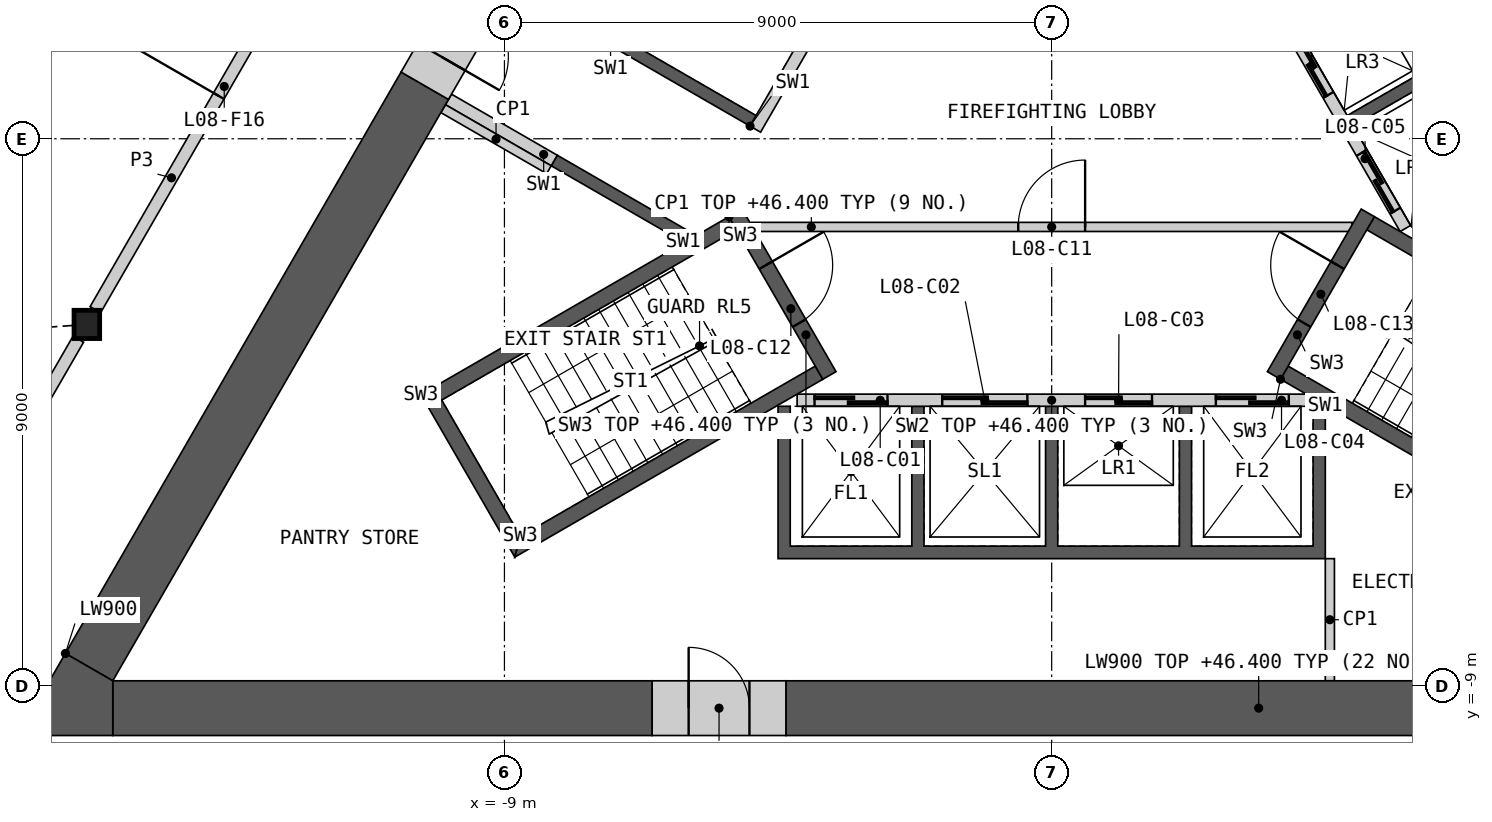
"""IFC4 building model, lengths in metres.
Left out: names, types, materials, properties, quantities, classifications, styles, units other than length and angle.
Written with IfcOpenShell. Run it as: python <this file> out.ifc"""

import sys

from ifc_helpers import new_model, si_unit, direction, frame, frame_2d, origin, origin_2d, place, context, subcontext, project, spatial, polyline, rectangle, i_section, outline, extrude, element, fill, save


model = new_model("IFC4")
c1 = context("Model", 3, precision=1e-05, world=origin(), true_north=direction((0.0, 1.0)))
c2 = subcontext(c1, "Body", "Model", "MODEL_VIEW")
j1 = project(units=[si_unit("LENGTHUNIT", "METRE"), si_unit("PLANEANGLEUNIT", "RADIAN")], contexts=[c1])
p1 = place(None, origin())
s1 = spatial("IfcSite", under=j1, at=p1, CompositionType="ELEMENT")
p2 = place(p1, origin())
s2 = spatial("IfcBuilding", under=s1, at=p2, CompositionType="ELEMENT")
p3 = place(p2, frame((0.0, 0.0, 42.6)))
s3 = spatial("IfcBuildingStorey", under=s2, at=p3, CompositionType="ELEMENT", Elevation=42.6)
p4 = place(p3, frame((-15.868, -3.054, 0.0), z_axis=(0.0, 0.0, 1.0), x_axis=(1.0, 0.0, 0.0)))
e1 = element("IfcColumn", 1, at=p4, inside=s3, PredefinedType="COLUMN", context=c2, shape_type="SweptSolid", body=[
    extrude(i_section(OverallWidth=0.421, OverallDepth=0.465, WebThickness=0.045, FlangeThickness=0.072, at=origin_2d()), origin(), (0.0, 0.0, 1.0), 4.2),
])
p5 = place(p3, origin())
e2 = element("IfcWall", 2, at=p5, inside=s3, PredefinedType="SHEAR", context=c2, shape_type="SweptSolid", body=[
    extrude(outline(polyline([(4.5, -4.4), (4.5, -6.906), (-4.5, -6.906), (-4.5, -4.4), (-4.3, -4.4), (-4.3, -6.7), (-2.3, -6.7), (-2.3, -4.4), (-2.1, -4.4), (-2.1, -6.7), (-0.1, -6.7), (-0.1, -4.4), (0.1, -4.4), (0.1, -6.7), (2.1, -6.7), (2.1, -4.4), (2.3, -4.4), (2.3, -6.7), (4.3, -6.7), (4.3, -4.4), (4.5, -4.4)])), origin(), (0.0, 0.0, 1.0), 3.8),
])
p6 = place(p3, frame((-4.187, -4.3, 0.0), z_axis=(0.0, 0.0, 1.0), x_axis=(1.0, 0.0, 0.0)))
e3 = element("IfcWall", 3, at=p6, inside=s3, PredefinedType="SOLIDWALL", context=c2, shape_type="SweptSolid", body=[
    extrude(rectangle(XDim=8.373, YDim=0.2, at=frame_2d((4.187, 0.0))), origin(), (0.0, 0.0, 1.0), 3.8),
])
p7 = place(p6, frame((0.287, 0.0, 0.0)))
e4 = element("IfcOpeningElement", 4, at=p7, cuts=e3, PredefinedType="OPENING", context=c2, shape_type="SweptSolid", body=[
    extrude(rectangle(XDim=1.2, YDim=2.1, at=frame_2d((0.6, 1.05))), frame((0.0, 0.11, 0.0), z_axis=(0.0, -1.0, 0.0), x_axis=(1.0, 0.0, 0.0)), (0.0, 0.0, 1.0), 0.22),
])
p8 = place(p6, frame((2.387, 0.0, 0.0)))
e5 = element("IfcOpeningElement", 5, at=p8, cuts=e3, PredefinedType="OPENING", context=c2, shape_type="SweptSolid", body=[
    extrude(rectangle(XDim=1.4, YDim=2.1, at=frame_2d((0.7, 1.05))), frame((0.0, 0.11, 0.0), z_axis=(0.0, -1.0, 0.0), x_axis=(1.0, 0.0, 0.0)), (0.0, 0.0, 1.0), 0.22),
])
p9 = place(p6, frame((4.737, 0.0, 0.0)))
e6 = element("IfcOpeningElement", 6, at=p9, cuts=e3, PredefinedType="OPENING", context=c2, shape_type="SweptSolid", body=[
    extrude(rectangle(XDim=1.1, YDim=2.1, at=frame_2d((0.55, 1.05))), frame((0.0, 0.11, 0.0), z_axis=(0.0, -1.0, 0.0), x_axis=(1.0, 0.0, 0.0)), (0.0, 0.0, 1.0), 0.22),
])
p10 = place(p6, frame((6.887, 0.0, 0.0)))
e7 = element("IfcOpeningElement", 7, at=p10, cuts=e3, PredefinedType="OPENING", context=c2, shape_type="SweptSolid", body=[
    extrude(rectangle(XDim=1.2, YDim=2.1, at=frame_2d((0.6, 1.05))), frame((0.0, 0.11, 0.0), z_axis=(0.0, -1.0, 0.0), x_axis=(1.0, 0.0, 0.0)), (0.0, 0.0, 1.0), 0.22),
])
p11 = place(p3, origin())
e8 = element("IfcWall", 8, at=p11, inside=s3, PredefinedType="SHEAR", context=c2, shape_type="SweptSolid", body=[
    extrude(outline(polyline([(2.66, 4.192), (4.831, 5.445), (8.231, -0.444), (6.061, -1.697), (5.96, -1.524), (7.952, -0.374), (6.952, 1.358), (4.96, 0.208), (4.861, 0.381), (6.852, 1.531), (5.852, 3.263), (3.861, 2.113), (3.76, 2.287), (5.752, 3.437), (4.752, 5.169), (2.76, 4.019), (2.66, 4.192)])), origin(), (0.0, 0.0, 1.0), 3.8),
])
p12 = place(p3, frame((5.817, -1.476, 0.0), z_axis=(0.0, 0.0, 1.0), x_axis=(-0.500002616675, 0.866023893041, 0.0)))
e9 = element("IfcWall", 9, at=p12, inside=s3, PredefinedType="SOLIDWALL", context=c2, shape_type="SweptSolid", body=[
    extrude(rectangle(XDim=8.373, YDim=0.2, at=frame_2d((4.187, 0.0))), origin(), (0.0, 0.0, 1.0), 3.8),
])
p13 = place(p12, frame((0.337, 0.0, 0.0)))
e10 = element("IfcOpeningElement", 10, at=p13, cuts=e9, PredefinedType="OPENING", context=c2, shape_type="SweptSolid", body=[
    extrude(rectangle(XDim=1.1, YDim=2.1, at=frame_2d((0.55, 1.05))), frame((0.0, 0.11, 0.0), z_axis=(0.0, -1.0, 0.0), x_axis=(1.0, 0.0, 0.0)), (0.0, 0.0, 1.0), 0.22),
])
p14 = place(p12, frame((2.537, 0.0, 0.0)))
e11 = element("IfcOpeningElement", 11, at=p14, cuts=e9, PredefinedType="OPENING", context=c2, shape_type="SweptSolid", body=[
    extrude(rectangle(XDim=1.1, YDim=2.1, at=frame_2d((0.55, 1.05))), frame((0.0, 0.11, 0.0), z_axis=(0.0, -1.0, 0.0), x_axis=(1.0, 0.0, 0.0)), (0.0, 0.0, 1.0), 0.22),
])
p15 = place(p12, frame((4.737, 0.0, 0.0)))
e12 = element("IfcOpeningElement", 12, at=p15, cuts=e9, PredefinedType="OPENING", context=c2, shape_type="SweptSolid", body=[
    extrude(rectangle(XDim=1.1, YDim=2.1, at=frame_2d((0.55, 1.05))), frame((0.0, 0.11, 0.0), z_axis=(0.0, -1.0, 0.0), x_axis=(1.0, 0.0, 0.0)), (0.0, 0.0, 1.0), 0.22),
])
p16 = place(p12, frame((7.037, 0.0, 0.0)))
e13 = element("IfcOpeningElement", 13, at=p16, cuts=e9, PredefinedType="OPENING", context=c2, shape_type="SweptSolid", body=[
    extrude(rectangle(XDim=0.9, YDim=2.1, at=frame_2d((0.45, 1.05))), frame((0.0, 0.11, 0.0), z_axis=(0.0, -1.0, 0.0), x_axis=(1.0, 0.0, 0.0)), (0.0, 0.0, 1.0), 0.22),
])
p17 = place(p3, origin())
e14 = element("IfcWall", 14, at=p17, inside=s3, PredefinedType="SHEAR", context=c2, shape_type="SweptSolid", body=[
    extrude(outline(polyline([(-6.061, -1.697), (-8.231, -0.444), (-8.131, -0.271), (-5.96, -1.524), (-6.061, -1.697)])), origin(), (0.0, 0.0, 1.0), 3.8),
])
p18 = place(p3, origin())
e15 = element("IfcWall", 15, at=p18, inside=s3, PredefinedType="SHEAR", context=c2, shape_type="SweptSolid", body=[
    extrude(outline(polyline([(-4.96, 0.208), (-7.131, 1.461), (-5.931, 3.54), (-3.76, 2.287), (-3.861, 2.113), (-5.852, 3.263), (-6.852, 1.531), (-4.861, 0.381), (-4.96, 0.208)])), origin(), (0.0, 0.0, 1.0), 3.8),
])
p19 = place(p3, frame((-1.631, 5.776, 0.0), z_axis=(0.0, 0.0, 1.0), x_axis=(-0.499992876559, -0.866029516466, 0.0)))
e16 = element("IfcWall", 16, at=p19, inside=s3, PredefinedType="SOLIDWALL", context=c2, shape_type="SweptSolid", body=[
    extrude(rectangle(XDim=6.486, YDim=0.2, at=frame_2d((3.243, 0.0))), origin(), (0.0, 0.0, 1.0), 3.8),
])
p20 = place(p19, frame((0.437, 0.0, 0.0)))
e17 = element("IfcOpeningElement", 17, at=p20, cuts=e16, PredefinedType="OPENING", context=c2, shape_type="SweptSolid", body=[
    extrude(rectangle(XDim=0.9, YDim=2.1, at=frame_2d((0.45, 1.05))), frame((0.0, 0.11, 0.0), z_axis=(0.0, -1.0, 0.0), x_axis=(1.0, 0.0, 0.0)), (0.0, 0.0, 1.0), 0.22),
])
p21 = place(p19, frame((2.637, 0.0, 0.0)))
e18 = element("IfcOpeningElement", 18, at=p21, cuts=e16, PredefinedType="OPENING", context=c2, shape_type="SweptSolid", body=[
    extrude(rectangle(XDim=0.9, YDim=2.1, at=frame_2d((0.45, 1.05))), frame((0.0, 0.11, 0.0), z_axis=(0.0, -1.0, 0.0), x_axis=(1.0, 0.0, 0.0)), (0.0, 0.0, 1.0), 0.22),
])
p22 = place(p3, frame((-8.181, -0.357, 0.0), z_axis=(0.0, 0.0, 1.0), x_axis=(-0.866035824272, 0.499981950752, 0.0)))
e19 = element("IfcWall", 19, at=p22, inside=s3, PredefinedType="SHEAR", context=c2, shape_type="SweptSolid", body=[
    extrude(rectangle(XDim=2.009, YDim=0.2, at=frame_2d((1.004, 0.0))), origin(), (0.0, 0.0, 1.0), 3.8),
])
p23 = place(p3, frame((-4.941, -1.45, 0.0), z_axis=(0.0, 0.0, 1.0), x_axis=(1.0, 0.0, 0.0)))
e20 = element("IfcWall", 20, at=p23, inside=s3, PredefinedType="PARTITIONING", context=c2, shape_type="SweptSolid", body=[
    extrude(rectangle(XDim=9.882, YDim=0.15, at=frame_2d((4.941, 0.0))), origin(), (0.0, 0.0, 1.0), 3.8),
])
p24 = place(p23, frame((4.391, 0.0, 0.0)))
e21 = element("IfcOpeningElement", 21, at=p24, cuts=e20, PredefinedType="OPENING", context=c2, shape_type="SweptSolid", body=[
    extrude(rectangle(XDim=1.1, YDim=2.1, at=frame_2d((0.55, 1.05))), frame((0.0, 0.085, 0.0), z_axis=(0.0, -1.0, 0.0), x_axis=(1.0, 0.0, 0.0)), (0.0, 0.0, 1.0), 0.17),
])
p25 = place(p3, origin())
e22 = element("IfcWall", 22, at=p25, inside=s3, PredefinedType="SHEAR", context=c2, shape_type="SweptSolid", body=[
    extrude(outline(polyline([(-5.307, -1.281), (-10.374, -4.206), (-10.032, -4.298), (-5.182, -1.498), (-5.307, -1.281)])), origin(), (0.0, 0.0, 1.0), 3.8),
])
p26 = place(p3, origin())
e23 = element("IfcWall", 23, at=p26, inside=s3, PredefinedType="SHEAR", context=c2, shape_type="SweptSolid", body=[
    extrude(outline(polyline([(-10.374, -4.206), (-8.83, -6.881), (-8.738, -6.539), (-10.032, -4.298), (-10.374, -4.206)])), origin(), (0.0, 0.0, 1.0), 3.8),
])
p27 = place(p3, origin())
e24 = element("IfcWall", 24, at=p27, inside=s3, PredefinedType="SHEAR", context=c2, shape_type="SweptSolid", body=[
    extrude(outline(polyline([(-8.738, -6.539), (-8.83, -6.881), (-3.763, -3.956), (-3.888, -3.739), (-8.738, -6.539)])), origin(), (0.0, 0.0, 1.0), 3.8),
])
p28 = place(p3, frame((-5.199, -1.219, 0.0), z_axis=(0.0, 0.0, 1.0), x_axis=(0.499982516597, -0.866035497597, 0.0)))
e25 = element("IfcWall", 25, at=p28, inside=s3, PredefinedType="SHEAR", context=c2, shape_type="SweptSolid", body=[
    extrude(rectangle(XDim=3.088, YDim=0.25, at=frame_2d((1.544, 0.0))), origin(), (0.0, 0.0, 1.0), 3.8),
])
p29 = place(p28, frame((0.994, 0.0, 0.0)))
e26 = element("IfcOpeningElement", 26, at=p29, cuts=e25, PredefinedType="OPENING", context=c2, shape_type="SweptSolid", body=[
    extrude(rectangle(XDim=1.1, YDim=2.1, at=frame_2d((0.55, 1.05))), frame((0.0, 0.135, 0.0), z_axis=(0.0, -1.0, 0.0), x_axis=(1.0, 0.0, 0.0)), (0.0, 0.0, 1.0), 0.27),
])
p30 = place(p3, origin())
e27 = element("IfcWall", 27, at=p30, inside=s3, PredefinedType="SHEAR", context=c2, shape_type="SweptSolid", body=[
    extrude(outline(polyline([(3.763, -3.956), (8.83, -6.881), (8.738, -6.539), (3.888, -3.739), (3.763, -3.956)])), origin(), (0.0, 0.0, 1.0), 3.8),
])
p31 = place(p3, origin())
e28 = element("IfcWall", 28, at=p31, inside=s3, PredefinedType="SHEAR", context=c2, shape_type="SweptSolid", body=[
    extrude(outline(polyline([(10.032, -4.298), (10.374, -4.206), (5.307, -1.281), (5.182, -1.498), (10.032, -4.298)])), origin(), (0.0, 0.0, 1.0), 3.8),
])
p32 = place(p3, frame((3.655, -3.893, 0.0), z_axis=(0.0, 0.0, 1.0), x_axis=(0.499982516597, 0.866035497597, 0.0)))
e29 = element("IfcWall", 29, at=p32, inside=s3, PredefinedType="SHEAR", context=c2, shape_type="SweptSolid", body=[
    extrude(rectangle(XDim=3.088, YDim=0.25, at=frame_2d((1.544, 0.0))), origin(), (0.0, 0.0, 1.0), 3.8),
])
p33 = place(p32, frame((0.994, 0.0, 0.0)))
e30 = element("IfcOpeningElement", 30, at=p33, cuts=e29, PredefinedType="OPENING", context=c2, shape_type="SweptSolid", body=[
    extrude(rectangle(XDim=1.1, YDim=2.1, at=frame_2d((0.55, 1.05))), frame((0.0, 0.135, 0.0), z_axis=(0.0, -1.0, 0.0), x_axis=(1.0, 0.0, 0.0)), (0.0, 0.0, 1.0), 0.27),
])
p34 = place(p3, frame((-8.268, -0.509, 0.0), z_axis=(0.0, 0.0, 1.0), x_axis=(-0.866035824272, 0.499981950752, 0.0)))
e31 = element("IfcWall", 31, at=p34, inside=s3, PredefinedType="PARTITIONING", context=c2, shape_type="SweptSolid", body=[
    extrude(rectangle(XDim=2.009, YDim=0.15, at=frame_2d((1.004, 0.0))), origin(), (0.0, 0.0, 1.0), 3.8),
])
p35 = place(p3, frame((4.575, -6.906, 0.0), z_axis=(0.0, 0.0, 1.0), x_axis=(0.0, -1.0, 0.0)))
e32 = element("IfcWall", 32, at=p35, inside=s3, PredefinedType="PARTITIONING", context=c2, shape_type="SweptSolid", body=[
    extrude(rectangle(XDim=2.009, YDim=0.15, at=frame_2d((1.004, 0.0))), origin(), (0.0, 0.0, 1.0), 3.8),
])
p36 = place(p3, frame((-4.371, -9.365, 0.0), z_axis=(0.0, 0.0, 1.0), x_axis=(1.0, 0.0, 0.0)))
e33 = element("IfcWall", 33, at=p36, inside=s3, PredefinedType="SHEAR", context=c2, shape_type="SweptSolid", body=[
    extrude(rectangle(XDim=15.55, YDim=0.9, at=frame_2d((7.775, 0.0))), origin(), (0.0, 0.0, 1.0), 3.8),
])
p37 = place(p3, frame((-15.441, -9.365, 0.0), z_axis=(0.0, 0.0, 1.0), x_axis=(1.0, 0.0, 0.0)))
e34 = element("IfcWall", 34, at=p37, inside=s3, PredefinedType="SHEAR", context=c2, shape_type="SweptSolid", body=[
    extrude(rectangle(XDim=8.871, YDim=0.9, at=frame_2d((4.435, 0.0))), origin(), (0.0, 0.0, 1.0), 3.8),
])
p38 = place(p3, frame((-10.31, 0.872, 0.0), z_axis=(0.0, 0.0, 1.0), x_axis=(-0.499991697393, -0.866030197244, 0.0)))
e35 = element("IfcWall", 35, at=p38, inside=s3, PredefinedType="SHEAR", context=c2, shape_type="SweptSolid", body=[
    extrude(rectangle(XDim=11.041, YDim=0.9, at=frame_2d((5.521, 0.0))), origin(), (0.0, 0.0, 1.0), 3.8),
])
p39 = place(p3, origin())
e36 = element("IfcWall", 36, at=p39, inside=s3, PredefinedType="SHEAR", context=c2, shape_type="SweptSolid", body=[
    extrude(outline(polyline([(-16.221, -8.465), (-15.441, -8.915), (-15.441, -9.815), (-17.0, -9.815), (-16.221, -8.465)])), origin(), (0.0, 0.0, 1.0), 3.8),
])
p40 = place(p3, frame((-6.571, -9.365, 0.0), z_axis=(0.0, 0.0, 1.0), x_axis=(1.0, 0.0, 0.0)))
e37 = element("IfcWall", 37, at=p40, inside=s3, PredefinedType="SHEAR", context=c2, shape_type="SweptSolid", body=[
    extrude(rectangle(XDim=2.2, YDim=0.9, at=frame_2d((1.1, 0.0))), origin(), (0.0, 0.0, 1.0), 3.8),
])
p41 = place(p40, frame((0.6, 0.0, 0.0)))
e38 = element("IfcOpeningElement", 38, at=p41, cuts=e37, PredefinedType="OPENING", context=c2, shape_type="SweptSolid", body=[
    extrude(rectangle(XDim=1.0, YDim=2.1, at=frame_2d((0.5, 1.05))), frame((0.0, 0.46, 0.0), z_axis=(0.0, -1.0, 0.0), x_axis=(1.0, 0.0, 0.0)), (0.0, 0.0, 1.0), 0.92),
])
p42 = place(p3, frame((-9.21, 2.777, 0.0), z_axis=(0.0, 0.0, 1.0), x_axis=(-0.500077893725, -0.86598042715, 0.0)))
e39 = element("IfcWall", 39, at=p42, inside=s3, PredefinedType="SHEAR", context=c2, shape_type="SweptSolid", body=[
    extrude(rectangle(XDim=2.2, YDim=0.9, at=frame_2d((1.1, 0.0))), origin(), (0.0, 0.0, 1.0), 3.8),
])
p43 = place(p42, frame((0.55, 0.0, 0.0)))
e40 = element("IfcOpeningElement", 40, at=p43, cuts=e39, PredefinedType="OPENING", context=c2, shape_type="SweptSolid", body=[
    extrude(rectangle(XDim=1.1, YDim=2.1, at=frame_2d((0.55, 1.05))), frame((0.0, 0.46, 0.0), z_axis=(0.0, -1.0, 0.0), x_axis=(1.0, 0.0, 0.0)), (0.0, 0.0, 1.0), 0.92),
])
p44 = place(p3, frame((-15.728, -2.811, 0.0), z_axis=(0.0, 0.0, 1.0), x_axis=(0.49999175339, 0.866030164915, 0.0)))
e41 = element("IfcWall", 41, at=p44, inside=s3, PredefinedType="PARTITIONING", context=c2, shape_type="SweptSolid", body=[
    extrude(rectangle(XDim=10.019, YDim=0.2, at=frame_2d((5.009, 0.0))), origin(), (0.0, 0.0, 1.0), 3.8),
])
p45 = place(p44, frame((4.059, 0.0, 0.0)))
e42 = element("IfcOpeningElement", 42, at=p45, cuts=e41, PredefinedType="OPENING", context=c2, shape_type="SweptSolid", body=[
    extrude(rectangle(XDim=1.8, YDim=2.1, at=frame_2d((0.9, 1.05))), frame((0.0, 0.11, 0.0), z_axis=(0.0, -1.0, 0.0), x_axis=(1.0, 0.0, 0.0)), (0.0, 0.0, 1.0), 0.22),
])
p46 = place(p3, frame((-19.244, -8.902, 0.0), z_axis=(0.0, 0.0, 1.0), x_axis=(0.499984737558, 0.86603421538, 0.0)))
e43 = element("IfcWall", 43, at=p46, inside=s3, PredefinedType="PARTITIONING", context=c2, shape_type="SweptSolid", body=[
    extrude(rectangle(XDim=6.473, YDim=0.2, at=frame_2d((3.236, 0.0))), origin(), (0.0, 0.0, 1.0), 3.8),
])
p47 = place(p7, origin())
e44 = element("IfcDoor", 44, at=p47, inside=s3, OperationType="SLIDING_TO_LEFT", PredefinedType="DOOR", context=c2, shape_type="SweptSolid", body=[
    extrude(rectangle(XDim=1.2, YDim=2.1, at=frame_2d((0.6, 1.05))), frame((0.0, 0.025, 0.0), z_axis=(0.0, -1.0, 0.0), x_axis=(1.0, 0.0, 0.0)), (0.0, 0.0, 1.0), 0.05),
])
fill(e4, e44)
p48 = place(p8, origin())
e45 = element("IfcDoor", 45, at=p48, inside=s3, OperationType="SLIDING_TO_LEFT", PredefinedType="DOOR", context=c2, shape_type="SweptSolid", body=[
    extrude(rectangle(XDim=1.4, YDim=2.1, at=frame_2d((0.7, 1.05))), frame((0.0, 0.025, 0.0), z_axis=(0.0, -1.0, 0.0), x_axis=(1.0, 0.0, 0.0)), (0.0, 0.0, 1.0), 0.05),
])
fill(e5, e45)
p49 = place(p9, origin())
e46 = element("IfcDoor", 46, at=p49, inside=s3, OperationType="SLIDING_TO_LEFT", PredefinedType="DOOR", context=c2, shape_type="SweptSolid", body=[
    extrude(rectangle(XDim=1.1, YDim=2.1, at=frame_2d((0.55, 1.05))), frame((0.0, 0.025, 0.0), z_axis=(0.0, -1.0, 0.0), x_axis=(1.0, 0.0, 0.0)), (0.0, 0.0, 1.0), 0.05),
])
fill(e6, e46)
p50 = place(p10, origin())
e47 = element("IfcDoor", 47, at=p50, inside=s3, OperationType="SLIDING_TO_LEFT", PredefinedType="DOOR", context=c2, shape_type="SweptSolid", body=[
    extrude(rectangle(XDim=1.2, YDim=2.1, at=frame_2d((0.6, 1.05))), frame((0.0, 0.025, 0.0), z_axis=(0.0, -1.0, 0.0), x_axis=(1.0, 0.0, 0.0)), (0.0, 0.0, 1.0), 0.05),
])
fill(e7, e47)
p51 = place(p13, origin())
e48 = element("IfcDoor", 48, at=p51, inside=s3, OperationType="SLIDING_TO_LEFT", PredefinedType="DOOR", context=c2, shape_type="SweptSolid", body=[
    extrude(rectangle(XDim=1.1, YDim=2.1, at=frame_2d((0.55, 1.05))), frame((0.0, 0.025, 0.0), z_axis=(0.0, -1.0, 0.0), x_axis=(1.0, 0.0, 0.0)), (0.0, 0.0, 1.0), 0.05),
])
fill(e10, e48)
p52 = place(p14, origin())
e49 = element("IfcDoor", 49, at=p52, inside=s3, OperationType="SLIDING_TO_LEFT", PredefinedType="DOOR", context=c2, shape_type="SweptSolid", body=[
    extrude(rectangle(XDim=1.1, YDim=2.1, at=frame_2d((0.55, 1.05))), frame((0.0, 0.025, 0.0), z_axis=(0.0, -1.0, 0.0), x_axis=(1.0, 0.0, 0.0)), (0.0, 0.0, 1.0), 0.05),
])
fill(e11, e49)
p53 = place(p24, origin())
e50 = element("IfcDoor", 50, at=p53, inside=s3, OperationType="SINGLE_SWING_RIGHT", PredefinedType="DOOR", context=c2, shape_type="SweptSolid", body=[
    extrude(rectangle(XDim=1.1, YDim=2.1, at=frame_2d((0.55, 1.05))), frame((0.0, 0.025, 0.0), z_axis=(0.0, -1.0, 0.0), x_axis=(1.0, 0.0, 0.0)), (0.0, 0.0, 1.0), 0.05),
])
fill(e21, e50)
p54 = place(p29, origin())
e51 = element("IfcDoor", 51, at=p54, inside=s3, OperationType="SINGLE_SWING_LEFT", PredefinedType="DOOR", context=c2, shape_type="SweptSolid", body=[
    extrude(rectangle(XDim=1.1, YDim=2.1, at=frame_2d((0.55, 1.05))), frame((0.0, 0.025, 0.0), z_axis=(0.0, -1.0, 0.0), x_axis=(1.0, 0.0, 0.0)), (0.0, 0.0, 1.0), 0.05),
])
fill(e26, e51)
p55 = place(p33, origin())
e52 = element("IfcDoor", 52, at=p55, inside=s3, OperationType="SINGLE_SWING_RIGHT", PredefinedType="DOOR", context=c2, shape_type="SweptSolid", body=[
    extrude(rectangle(XDim=1.1, YDim=2.1, at=frame_2d((0.55, 1.05))), frame((0.0, 0.025, 0.0), z_axis=(0.0, -1.0, 0.0), x_axis=(1.0, 0.0, 0.0)), (0.0, 0.0, 1.0), 0.05),
])
fill(e30, e52)
p56 = place(p41, origin())
e53 = element("IfcDoor", 53, at=p56, inside=s3, OperationType="SINGLE_SWING_LEFT", PredefinedType="DOOR", context=c2, shape_type="SweptSolid", body=[
    extrude(rectangle(XDim=1.0, YDim=2.1, at=frame_2d((0.5, 1.05))), frame((0.0, 0.205, 0.0), z_axis=(0.0, -1.0, 0.0), x_axis=(1.0, 0.0, 0.0)), (0.0, 0.0, 1.0), 0.05),
])
fill(e38, e53)
p57 = place(p43, origin())
e54 = element("IfcDoor", 54, at=p57, inside=s3, OperationType="SINGLE_SWING_RIGHT", PredefinedType="DOOR", context=c2, shape_type="SweptSolid", body=[
    extrude(rectangle(XDim=1.1, YDim=2.1, at=frame_2d((0.55, 1.05))), frame((0.0, 0.205, 0.0), z_axis=(0.0, -1.0, 0.0), x_axis=(1.0, 0.0, 0.0)), (0.0, 0.0, 1.0), 0.05),
])
fill(e40, e54)
p58 = place(p45, origin())
e55 = element("IfcDoor", 55, at=p58, inside=s3, OperationType="DOUBLE_DOOR_SINGLE_SWING", PredefinedType="DOOR", context=c2, shape_type="SweptSolid", body=[
    extrude(rectangle(XDim=1.8, YDim=2.1, at=frame_2d((0.9, 1.05))), frame((0.0, 0.025, 0.0), z_axis=(0.0, -1.0, 0.0), x_axis=(1.0, 0.0, 0.0)), (0.0, 0.0, 1.0), 0.05),
])
fill(e42, e55)
save(model, sys.argv[1])
